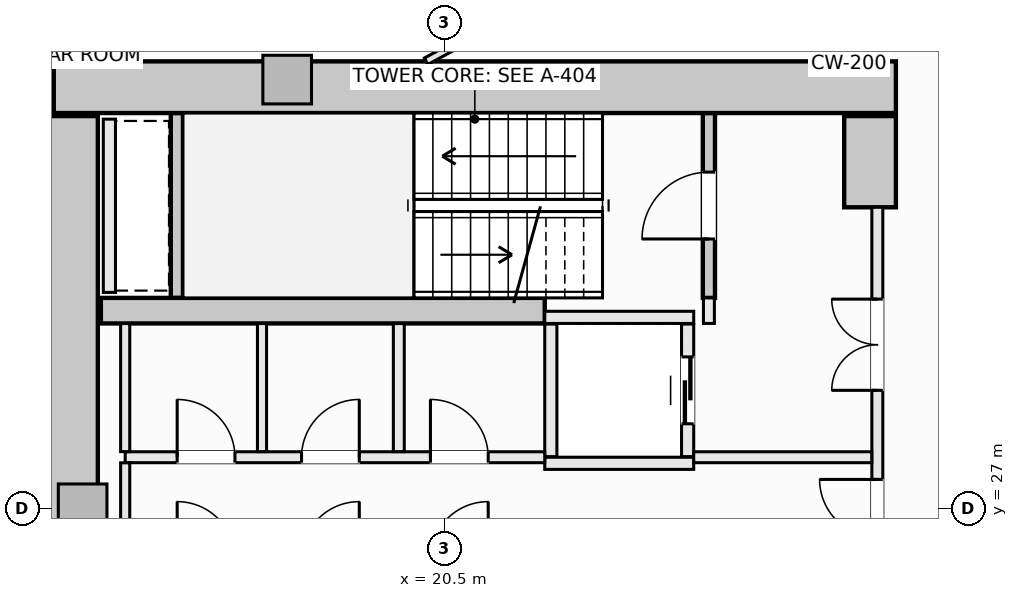
"""IFC4 building model, lengths in metres.
Left out: names, types, materials, properties, quantities, classifications, styles, units other than length and angle.
Written with IfcOpenShell. Run it as: python <this file> out.ifc"""

import sys

from ifc_helpers import new_model, si_unit, direction, frame, frame_2d, origin, origin_2d, place, context, subcontext, project, spatial, rectangle, extrude, element, fill, save


model = new_model("IFC4")
c1 = context("Model", 3, precision=1e-05, world=origin(), true_north=direction((0.0, 1.0)))
c2 = subcontext(c1, "Body", "Model", "MODEL_VIEW")
j1 = project(units=[si_unit("LENGTHUNIT", "METRE"), si_unit("PLANEANGLEUNIT", "RADIAN")], contexts=[c1])
p1 = place(None, origin())
s1 = spatial("IfcSite", under=j1, at=p1, CompositionType="ELEMENT")
p2 = place(p1, origin())
s2 = spatial("IfcBuilding", under=s1, at=p2, CompositionType="ELEMENT")
p3 = place(p2, frame((0.0, 0.0, 34.2)))
s3 = spatial("IfcBuildingStorey", under=s2, at=p3, CompositionType="ELEMENT", Elevation=34.2)
p4 = place(p3, frame((14.075, 33.925, -0.28), z_axis=(0.0, 0.0, 1.0), x_axis=(1.0, 0.0, 0.0)))
e1 = element("IfcWall", 1, at=p4, inside=s3, PredefinedType="SHEAR", context=c2, shape_type="SweptSolid", body=[
    extrude(rectangle(XDim=13.85, YDim=0.85, at=frame_2d((6.925, 0.0))), origin(), (0.0, 0.0, 1.0), 3.85),
])
p5 = place(p3, frame((14.375, 20.55, -0.28), z_axis=(0.0, 0.0, 1.0), x_axis=(0.0, 1.0, 0.0)))
e2 = element("IfcWall", 2, at=p5, inside=s3, PredefinedType="SHEAR", context=c2, shape_type="SweptSolid", body=[
    extrude(rectangle(XDim=12.9, YDim=0.85, at=frame_2d((6.45, 0.0))), origin(), (0.0, 0.0, 1.0), 3.85),
])
p6 = place(p3, frame((27.5, 31.95, -0.28), z_axis=(0.0, 0.0, 1.0), x_axis=(0.0, 1.0, 0.0)))
e3 = element("IfcWall", 3, at=p6, inside=s3, PredefinedType="SHEAR", context=c2, shape_type="SweptSolid", body=[
    extrude(rectangle(XDim=1.5, YDim=0.85, at=frame_2d((0.75, 0.0))), origin(), (0.0, 0.0, 1.0), 3.85),
])
p7 = place(p3, frame((14.85, 30.25, -0.28), z_axis=(0.0, 0.0, 1.0), x_axis=(1.0, 0.0, 0.0)))
e4 = element("IfcWall", 4, at=p7, inside=s3, PredefinedType="SHEAR", context=c2, shape_type="SweptSolid", body=[
    extrude(rectangle(XDim=7.3, YDim=0.42, at=frame_2d((3.65, 0.0))), origin(), (0.0, 0.0, 1.0), 3.85),
])
for number, where, z_axis, x_axis in (
    (5, (17.914, 34.05, -0.28), (0.0, 0.0, 1.0), (1.0, 0.0, 0.0)),
    (6, (14.55, 27.0, -0.28), (0.0, 0.0, 1.0), (1.0, 0.0, 0.0)),
):
    element("IfcColumn", number, at=place(p3, frame(where, z_axis=z_axis, x_axis=x_axis)), inside=s3, PredefinedType="PILASTER", context=c2, shape_type="SweptSolid", body=[
        extrude(rectangle(XDim=0.8, YDim=0.8, at=origin_2d()), origin(), (0.0, 0.0, 1.0), 3.85),
    ])
p8 = place(p3, frame((24.85, 30.46, -0.28), z_axis=(0.0, 0.0, 1.0), x_axis=(0.0, 1.0, 0.0)))
e7 = element("IfcWall", 7, at=p8, inside=s3, PredefinedType="SHEAR", context=c2, shape_type="SweptSolid", body=[
    extrude(rectangle(XDim=3.038, YDim=0.2, at=frame_2d((1.519, 0.0))), origin(), (0.0, 0.0, 1.0), 3.85),
])
p9 = place(p8, frame((0.969, 0.0, 0.28)))
e8 = element("IfcOpeningElement", 8, at=p9, cuts=e7, PredefinedType="OPENING", context=c2, shape_type="SweptSolid", body=[
    extrude(rectangle(XDim=1.1, YDim=2.15, at=frame_2d((0.55, 1.075))), frame((0.0, 0.11, 0.0), z_axis=(0.0, -1.0, 0.0), x_axis=(1.0, 0.0, 0.0)), (0.0, 0.0, 1.0), 0.22),
])
p10 = place(p3, frame((16.1, 30.462, -0.28), z_axis=(0.0, 0.0, 1.0), x_axis=(0.0, 1.0, 0.0)))
e9 = element("IfcWall", 9, at=p10, inside=s3, PredefinedType="SHEAR", context=c2, shape_type="SweptSolid", body=[
    extrude(rectangle(XDim=3.036, YDim=0.2, at=frame_2d((1.518, 0.0))), origin(), (0.0, 0.0, 1.0), 3.85),
])
for number, where, z_axis, x_axis in (
    (10, (22.15, 30.14, 0.0), (0.0, 0.0, 1.0), (1.0, 0.0, 0.0)),
    (11, (22.15, 27.74, 0.0), (0.0, 0.0, 1.0), (1.0, 0.0, 0.0)),
):
    element("IfcWall", number, at=place(p3, frame(where, z_axis=z_axis, x_axis=x_axis)), inside=s3, PredefinedType="SOLIDWALL", context=c2, shape_type="SweptSolid", body=[
        extrude(rectangle(XDim=2.45, YDim=0.2, at=frame_2d((1.225, 0.0))), origin(), (0.0, 0.0, 1.0), 3.57),
    ])
p11 = place(p3, frame((22.25, 27.85, 0.0), z_axis=(0.0, 0.0, 1.0), x_axis=(0.0, 1.0, 0.0)))
e12 = element("IfcWall", 12, at=p11, inside=s3, PredefinedType="SOLIDWALL", context=c2, shape_type="SweptSolid", body=[
    extrude(rectangle(XDim=2.18, YDim=0.2, at=frame_2d((1.09, 0.0))), origin(), (0.0, 0.0, 1.0), 3.57),
])
p12 = place(p3, frame((24.5, 27.85, 0.0), z_axis=(0.0, 0.0, 1.0), x_axis=(0.0, 1.0, 0.0)))
e13 = element("IfcWall", 13, at=p12, inside=s3, PredefinedType="SOLIDWALL", context=c2, shape_type="SweptSolid", body=[
    extrude(rectangle(XDim=2.18, YDim=0.2, at=frame_2d((1.09, 0.0))), origin(), (0.0, 0.0, 1.0), 3.57),
])
p13 = place(p12, frame((0.54, 0.0, 0.0)))
e14 = element("IfcOpeningElement", 14, at=p13, cuts=e13, PredefinedType="OPENING", context=c2, shape_type="SweptSolid", body=[
    extrude(rectangle(XDim=1.1, YDim=2.2, at=frame_2d((0.55, 1.1))), frame((0.0, 0.11, 0.0), z_axis=(0.0, -1.0, 0.0), x_axis=(1.0, 0.0, 0.0)), (0.0, 0.0, 1.0), 0.22),
])
p14 = place(p3, frame((14.99, 30.55, 0.0), z_axis=(0.0, 0.0, 1.0), x_axis=(0.0, 1.0, 0.0)))
e15 = element("IfcWall", 15, at=p14, inside=s3, PredefinedType="SOLIDWALL", context=c2, shape_type="SweptSolid", body=[
    extrude(rectangle(XDim=2.85, YDim=0.2, at=frame_2d((1.425, 0.0))), origin(), (0.0, 0.0, 1.0), 3.57),
])
p15 = place(p3, frame((24.85, 30.04, 0.0), z_axis=(0.0, 0.0, 1.0), x_axis=(0.0, 1.0, 0.0)))
e16 = element("IfcWall", 16, at=p15, inside=s3, PredefinedType="SOLIDWALL", context=c2, shape_type="SweptSolid", body=[
    extrude(rectangle(XDim=0.42, YDim=0.18, at=frame_2d((0.21, 0.0))), origin(), (0.0, 0.0, 1.0), 3.57),
])
p16 = place(p3, frame((27.62, 22.05, 0.0), z_axis=(0.0, 0.0, 1.0), x_axis=(0.0, 1.0, 0.0)))
e17 = element("IfcWall", 17, at=p16, inside=s3, PredefinedType="SOLIDWALL", context=c2, shape_type="SweptSolid", body=[
    extrude(rectangle(XDim=9.9, YDim=0.18, at=frame_2d((4.95, 0.0))), origin(), (0.0, 0.0, 1.0), 2.662),
])
p17 = place(p16, frame((4.475, 0.0, 0.0)))
e18 = element("IfcOpeningElement", 18, at=p17, cuts=e17, PredefinedType="OPENING", context=c2, shape_type="SweptSolid", body=[
    extrude(rectangle(XDim=0.95, YDim=2.1, at=frame_2d((0.475, 1.05))), frame((0.0, 0.1, 0.0), z_axis=(0.0, -1.0, 0.0), x_axis=(1.0, 0.0, 0.0)), (0.0, 0.0, 1.0), 0.2),
])
p18 = place(p16, frame((6.89, 0.0, 0.0)))
e19 = element("IfcOpeningElement", 19, at=p18, cuts=e17, PredefinedType="OPENING", context=c2, shape_type="SweptSolid", body=[
    extrude(rectangle(XDim=1.5, YDim=2.2, at=frame_2d((0.75, 1.1))), frame((0.0, 0.1, 0.0), z_axis=(0.0, -1.0, 0.0), x_axis=(1.0, 0.0, 0.0)), (0.0, 0.0, 1.0), 0.2),
])
p19 = place(p16, frame((1.51, 0.0, 0.0)))
e20 = element("IfcOpeningElement", 20, at=p19, cuts=e17, PredefinedType="OPENING", context=c2, shape_type="SweptSolid", body=[
    extrude(rectangle(XDim=1.5, YDim=2.2, at=frame_2d((0.75, 1.1))), frame((0.0, 0.1, 0.0), z_axis=(0.0, -1.0, 0.0), x_axis=(1.0, 0.0, 0.0)), (0.0, 0.0, 1.0), 0.2),
])
p20 = place(p3, frame((15.25, 27.84, 0.0), z_axis=(0.0, 0.0, 1.0), x_axis=(1.0, 0.0, 0.0)))
e21 = element("IfcWall", 21, at=p20, inside=s3, PredefinedType="SOLIDWALL", context=c2, shape_type="SweptSolid", body=[
    extrude(rectangle(XDim=6.9, YDim=0.18, at=frame_2d((3.45, 0.0))), origin(), (0.0, 0.0, 1.0), 3.57),
])
p21 = place(p20, frame((5.02, 0.0, 0.0)))
e22 = element("IfcOpeningElement", 22, at=p21, cuts=e21, PredefinedType="OPENING", context=c2, shape_type="SweptSolid", body=[
    extrude(rectangle(XDim=0.95, YDim=2.1, at=frame_2d((0.475, 1.05))), frame((0.0, 0.1, 0.0), z_axis=(0.0, -1.0, 0.0), x_axis=(1.0, 0.0, 0.0)), (0.0, 0.0, 1.0), 0.2),
])
p22 = place(p20, frame((0.855, 0.0, 0.0)))
e23 = element("IfcOpeningElement", 23, at=p22, cuts=e21, PredefinedType="OPENING", context=c2, shape_type="SweptSolid", body=[
    extrude(rectangle(XDim=0.95, YDim=2.1, at=frame_2d((0.475, 1.05))), frame((0.0, 0.1, 0.0), z_axis=(0.0, -1.0, 0.0), x_axis=(1.0, 0.0, 0.0)), (0.0, 0.0, 1.0), 0.2),
])
p23 = place(p20, frame((2.9, 0.0, 0.0)))
e24 = element("IfcOpeningElement", 24, at=p23, cuts=e21, PredefinedType="OPENING", context=c2, shape_type="SweptSolid", body=[
    extrude(rectangle(XDim=0.95, YDim=2.1, at=frame_2d((0.475, 1.05))), frame((0.0, 0.1, 0.0), z_axis=(0.0, -1.0, 0.0), x_axis=(1.0, 0.0, 0.0)), (0.0, 0.0, 1.0), 0.2),
])
p24 = place(p3, frame((24.6, 27.84, 0.0), z_axis=(0.0, 0.0, 1.0), x_axis=(1.0, 0.0, 0.0)))
e25 = element("IfcWall", 25, at=p24, inside=s3, PredefinedType="SOLIDWALL", context=c2, shape_type="SweptSolid", body=[
    extrude(rectangle(XDim=2.928, YDim=0.18, at=frame_2d((1.464, 0.0))), origin(), (0.0, 0.0, 1.0), 3.57),
])
p25 = place(p3, frame((15.25, 26.252, 0.0), z_axis=(0.0, 0.0, 1.0), x_axis=(0.0, 1.0, 0.0)))
e26 = element("IfcWall", 26, at=p25, inside=s3, PredefinedType="PARTITIONING", context=c2, shape_type="SweptSolid", body=[
    extrude(rectangle(XDim=1.496, YDim=0.15, at=frame_2d((0.748, 0.0))), origin(), (0.0, 0.0, 1.0), 3.57),
])
p26 = place(p3, frame((15.25, 27.932, 0.0), z_axis=(0.0, 0.0, 1.0), x_axis=(0.0, 1.0, 0.0)))
e27 = element("IfcWall", 27, at=p26, inside=s3, PredefinedType="PARTITIONING", context=c2, shape_type="SweptSolid", body=[
    extrude(rectangle(XDim=2.106, YDim=0.15, at=frame_2d((1.053, 0.0))), origin(), (0.0, 0.0, 1.0), 3.57),
])
p27 = place(p3, frame((19.75, 27.932, 0.0), z_axis=(0.0, 0.0, 1.0), x_axis=(0.0, 1.0, 0.0)))
e28 = element("IfcWall", 28, at=p27, inside=s3, PredefinedType="SOLIDWALL", context=c2, shape_type="SweptSolid", body=[
    extrude(rectangle(XDim=2.106, YDim=0.18, at=frame_2d((1.053, 0.0))), origin(), (0.0, 0.0, 1.0), 3.57),
])
p28 = place(p3, frame((17.5, 27.932, 0.0), z_axis=(0.0, 0.0, 1.0), x_axis=(0.0, 1.0, 0.0)))
e29 = element("IfcWall", 29, at=p28, inside=s3, PredefinedType="PARTITIONING", context=c2, shape_type="SweptSolid", body=[
    extrude(rectangle(XDim=2.106, YDim=0.15, at=frame_2d((1.053, 0.0))), origin(), (0.0, 0.0, 1.0), 3.57),
])
p29 = place(p3, frame((27.25, 34.352, 0.0), z_axis=(0.0, 0.0, 1.0), x_axis=(0.0, 1.0, 0.0)))
e30 = element("IfcWall", 30, at=p29, inside=s3, PredefinedType="PARTITIONING", context=c2, shape_type="SweptSolid", body=[
    extrude(rectangle(XDim=0.606, YDim=0.12, at=frame_2d((0.303, 0.0))), origin(), (0.0, 0.0, 1.0), 3.57),
])
p30 = place(p3, frame((20.199, 34.352, 0.0), z_axis=(0.0, 0.0, 1.0), x_axis=(0.880495630453, 0.474054263511, 0.0)))
e31 = element("IfcWall", 31, at=p30, inside=s3, PredefinedType="PARTITIONING", context=c2, shape_type="SweptSolid", body=[
    extrude(rectangle(XDim=1.278, YDim=0.12, at=frame_2d((0.639, 0.0))), origin(), (0.0, 0.0, 1.0), 3.57),
])
p31 = place(p9, origin())
e32 = element("IfcDoor", 32, at=p31, inside=s3, OperationType="SINGLE_SWING_LEFT", PredefinedType="DOOR", context=c2, shape_type="SweptSolid", body=[
    extrude(rectangle(XDim=1.1, YDim=2.15, at=frame_2d((0.55, 1.075))), frame((0.0, 0.025, 0.0), z_axis=(0.0, -1.0, 0.0), x_axis=(1.0, 0.0, 0.0)), (0.0, 0.0, 1.0), 0.05),
])
fill(e8, e32)
p32 = place(p13, origin())
e33 = element("IfcDoor", 33, at=p32, inside=s3, OperationType="SLIDING_TO_LEFT", PredefinedType="DOOR", context=c2, shape_type="SweptSolid", body=[
    extrude(rectangle(XDim=1.1, YDim=2.2, at=frame_2d((0.55, 1.1))), frame((0.0, 0.025, 0.0), z_axis=(0.0, -1.0, 0.0), x_axis=(1.0, 0.0, 0.0)), (0.0, 0.0, 1.0), 0.05),
])
fill(e14, e33)
p33 = place(p17, origin())
e34 = element("IfcDoor", 34, at=p33, inside=s3, OperationType="SINGLE_SWING_RIGHT", PredefinedType="DOOR", context=c2, shape_type="SweptSolid", body=[
    extrude(rectangle(XDim=0.95, YDim=2.1, at=frame_2d((0.475, 1.05))), frame((0.0, 0.025, 0.0), z_axis=(0.0, -1.0, 0.0), x_axis=(1.0, 0.0, 0.0)), (0.0, 0.0, 1.0), 0.05),
])
fill(e18, e34)
p34 = place(p18, origin())
e35 = element("IfcDoor", 35, at=p34, inside=s3, OperationType="DOUBLE_DOOR_SINGLE_SWING", PredefinedType="DOOR", context=c2, shape_type="SweptSolid", body=[
    extrude(rectangle(XDim=1.5, YDim=2.2, at=frame_2d((0.75, 1.1))), frame((0.0, 0.025, 0.0), z_axis=(0.0, -1.0, 0.0), x_axis=(1.0, 0.0, 0.0)), (0.0, 0.0, 1.0), 0.05),
])
fill(e19, e35)
p35 = place(p21, origin())
e36 = element("IfcDoor", 36, at=p35, inside=s3, OperationType="SINGLE_SWING_LEFT", PredefinedType="DOOR", context=c2, shape_type="SweptSolid", body=[
    extrude(rectangle(XDim=0.95, YDim=2.1, at=frame_2d((0.475, 1.05))), frame((0.0, 0.025, 0.0), z_axis=(0.0, -1.0, 0.0), x_axis=(1.0, 0.0, 0.0)), (0.0, 0.0, 1.0), 0.05),
])
fill(e22, e36)
p36 = place(p22, origin())
e37 = element("IfcDoor", 37, at=p36, inside=s3, OperationType="SINGLE_SWING_LEFT", PredefinedType="DOOR", context=c2, shape_type="SweptSolid", body=[
    extrude(rectangle(XDim=0.95, YDim=2.1, at=frame_2d((0.475, 1.05))), frame((0.0, 0.025, 0.0), z_axis=(0.0, -1.0, 0.0), x_axis=(1.0, 0.0, 0.0)), (0.0, 0.0, 1.0), 0.05),
])
fill(e23, e37)
p37 = place(p23, origin())
e38 = element("IfcDoor", 38, at=p37, inside=s3, OperationType="SINGLE_SWING_RIGHT", PredefinedType="DOOR", context=c2, shape_type="SweptSolid", body=[
    extrude(rectangle(XDim=0.95, YDim=2.1, at=frame_2d((0.475, 1.05))), frame((0.0, 0.025, 0.0), z_axis=(0.0, -1.0, 0.0), x_axis=(1.0, 0.0, 0.0)), (0.0, 0.0, 1.0), 0.05),
])
fill(e24, e38)
save(model, sys.argv[1])
